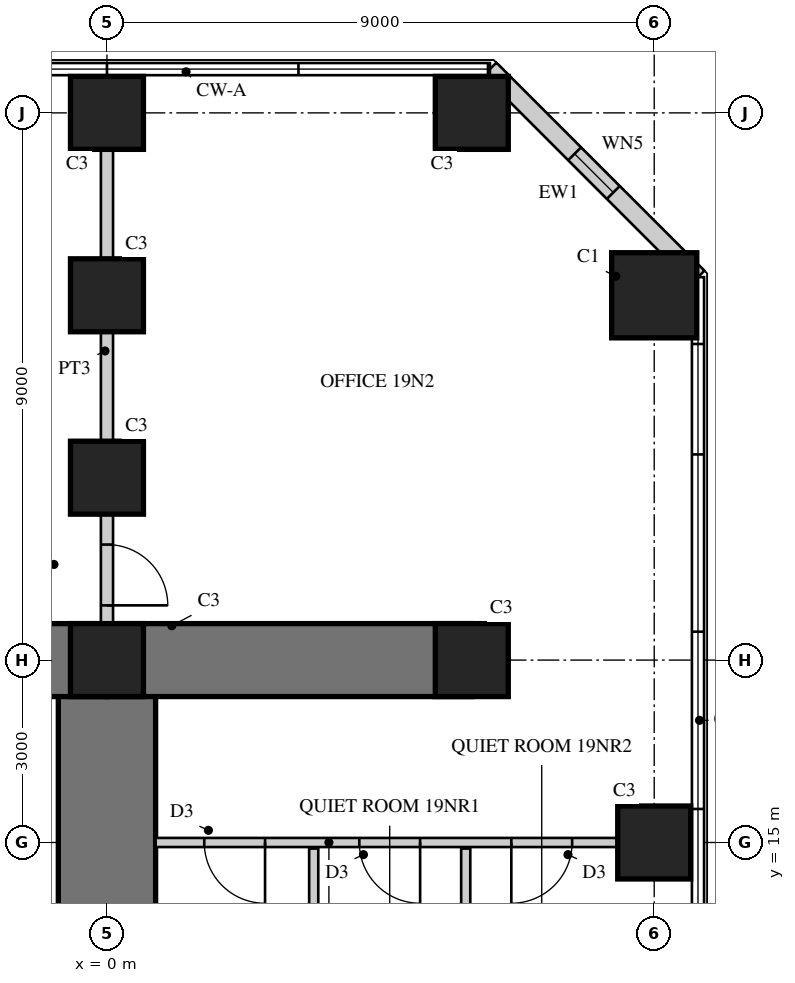
"""IFC4 building model, lengths in metres.
Left out: names, types, materials, properties, quantities, classifications, styles, units other than length and angle.
Written with IfcOpenShell. Run it as: python <this file> out.ifc"""

import sys

from ifc_helpers import new_model, si_unit, direction, frame, frame_2d, origin, origin_2d, place, context, subcontext, project, spatial, rectangle, hollow_rectangle, extrude, element, fill, save


model = new_model("IFC4")
c1 = context("Model", 3, precision=1e-05, world=origin(), true_north=direction((0.0, 1.0)))
c2 = subcontext(c1, "Body", "Model", "MODEL_VIEW")
j1 = project(units=[si_unit("LENGTHUNIT", "METRE"), si_unit("PLANEANGLEUNIT", "RADIAN")], contexts=[c1])
p1 = place(None, origin())
s1 = spatial("IfcSite", under=j1, at=p1, CompositionType="ELEMENT")
p2 = place(p1, origin())
s2 = spatial("IfcBuilding", under=s1, at=p2, CompositionType="ELEMENT")
p3 = place(p2, frame((0.0, 0.0, 79.5)))
s3 = spatial("IfcBuildingStorey", under=s2, at=p3, CompositionType="ELEMENT", Elevation=79.5)
p4 = place(p3, frame((0.0, 9.0, 0.0), z_axis=(0.0, 0.0, 1.0), x_axis=(0.0, 1.0, 0.0)))
e1 = element("IfcWall", 1, at=p4, inside=s3, PredefinedType="SHEAR", context=c2, shape_type="SweptSolid", body=[
    extrude(rectangle(XDim=9.0, YDim=1.6, at=frame_2d((4.5, 0.0))), origin(), (0.0, 0.0, 1.0), 4.0),
])
for number, where, z_axis, x_axis in (
    (2, (0.0, 18.0, 0.0), (0.0, 0.0, 1.0), (-1.0, 0.0, 0.0)),
    (3, (0.0, 18.0, 0.0), (0.0, 0.0, 1.0), (1.0, 0.0, 0.0)),
):
    element("IfcWall", number, at=place(p3, frame(where, z_axis=z_axis, x_axis=x_axis)), inside=s3, PredefinedType="SHEAR", context=c2, shape_type="SweptSolid", body=[
        extrude(rectangle(XDim=6.0, YDim=1.2, at=frame_2d((3.0, 0.0))), origin(), (0.0, 0.0, 1.0), 4.0),
    ])
p5 = place(p3, frame((9.0, 15.0, 0.0), z_axis=(0.0, 0.0, 1.0), x_axis=(1.0, 0.0, 0.0)))
e4 = element("IfcColumn", 4, at=p5, inside=s3, PredefinedType="COLUMN", context=c2, shape_type="SweptSolid", body=[
    extrude(rectangle(XDim=1.2, YDim=1.2, at=origin_2d()), origin(), (0.0, 0.0, 1.0), 4.0),
])
p6 = place(p3, frame((9.0, 24.0, 0.0), z_axis=(0.0, 0.0, 1.0), x_axis=(1.0, 0.0, 0.0)))
e5 = element("IfcColumn", 5, at=p6, inside=s3, PredefinedType="COLUMN", context=c2, shape_type="SweptSolid", body=[
    extrude(rectangle(XDim=1.4, YDim=1.4, at=origin_2d()), origin(), (0.0, 0.0, 1.0), 4.0),
])
for number, where, z_axis, x_axis in (
    (6, (6.0, 27.0, 0.0), (0.0, 0.0, 1.0), (1.0, 0.0, 0.0)),
    (7, (0.0, 27.0, 0.0), (0.0, 0.0, 1.0), (1.0, 0.0, 0.0)),
    (8, (6.0, 18.0, 0.0), (0.0, 0.0, 1.0), (1.0, 0.0, 0.0)),
    (9, (0.0, 18.0, 0.0), (0.0, 0.0, 1.0), (1.0, 0.0, 0.0)),
    (10, (0.0, 21.0, 0.0), (0.0, 0.0, 1.0), (1.0, 0.0, 0.0)),
    (11, (0.0, 24.0, 0.0), (0.0, 0.0, 1.0), (1.0, 0.0, 0.0)),
):
    element("IfcColumn", number, at=place(p3, frame(where, z_axis=z_axis, x_axis=x_axis)), inside=s3, PredefinedType="COLUMN", context=c2, shape_type="SweptSolid", body=[
        extrude(rectangle(XDim=1.2, YDim=1.2, at=origin_2d()), origin(), (0.0, 0.0, 1.0), 4.0),
    ])
p7 = place(p3, frame((9.72, 24.298, 0.0), z_axis=(0.0, 0.0, 1.0), x_axis=(-0.707106781187, 0.707106781187, 0.0)))
e12 = element("IfcWall", 12, at=p7, inside=s3, PredefinedType="SOLIDWALL", context=c2, shape_type="SweptSolid", body=[
    extrude(rectangle(XDim=4.839, YDim=0.3, at=frame_2d((2.419, 0.0))), origin(), (0.0, 0.0, 1.0), 3.8),
])
p8 = place(p7, frame((1.969, 0.0, 0.3)))
e13 = element("IfcOpeningElement", 13, at=p8, cuts=e12, PredefinedType="OPENING", context=c2, shape_type="SweptSolid", body=[
    extrude(rectangle(XDim=0.9, YDim=2.4, at=frame_2d((0.45, 1.2))), frame((0.0, 0.16, 0.0), z_axis=(0.0, -1.0, 0.0), x_axis=(1.0, 0.0, 0.0)), (0.0, 0.0, 1.0), 0.32),
])
p9 = place(p3, frame((8.4, 15.0, 0.0), z_axis=(0.0, 0.0, 1.0), x_axis=(-1.0, 0.0, 0.0)))
e14 = element("IfcWall", 14, at=p9, inside=s3, PredefinedType="PARTITIONING", context=c2, shape_type="SweptSolid", body=[
    extrude(rectangle(XDim=7.6, YDim=0.15, at=frame_2d((3.8, 0.0))), origin(), (0.0, 0.0, 1.0), 2.95),
])
p10 = place(p9, frame((0.75, 0.0, 0.0)))
e15 = element("IfcOpeningElement", 15, at=p10, cuts=e14, PredefinedType="OPENING", context=c2, shape_type="SweptSolid", body=[
    extrude(rectangle(XDim=1.0, YDim=2.1, at=frame_2d((0.5, 1.05))), frame((0.0, 0.085, 0.0), z_axis=(0.0, -1.0, 0.0), x_axis=(1.0, 0.0, 0.0)), (0.0, 0.0, 1.0), 0.17),
])
p11 = place(p9, frame((3.25, 0.0, 0.0)))
e16 = element("IfcOpeningElement", 16, at=p11, cuts=e14, PredefinedType="OPENING", context=c2, shape_type="SweptSolid", body=[
    extrude(rectangle(XDim=1.0, YDim=2.1, at=frame_2d((0.5, 1.05))), frame((0.0, 0.085, 0.0), z_axis=(0.0, -1.0, 0.0), x_axis=(1.0, 0.0, 0.0)), (0.0, 0.0, 1.0), 0.17),
])
p12 = place(p9, frame((5.8, 0.0, 0.0)))
e17 = element("IfcOpeningElement", 17, at=p12, cuts=e14, PredefinedType="OPENING", context=c2, shape_type="SweptSolid", body=[
    extrude(rectangle(XDim=1.0, YDim=2.1, at=frame_2d((0.5, 1.05))), frame((0.0, 0.085, 0.0), z_axis=(0.0, -1.0, 0.0), x_axis=(1.0, 0.0, 0.0)), (0.0, 0.0, 1.0), 0.17),
])
p13 = place(p3, frame((3.4, 9.65, 0.0), z_axis=(0.0, 0.0, 1.0), x_axis=(0.0, 1.0, 0.0)))
e18 = element("IfcWall", 18, at=p13, inside=s3, PredefinedType="PARTITIONING", context=c2, shape_type="SweptSolid", body=[
    extrude(rectangle(XDim=5.25, YDim=0.15, at=frame_2d((2.625, 0.0))), origin(), (0.0, 0.0, 1.0), 3.8),
])
p14 = place(p3, frame((5.9, 9.65, 0.0), z_axis=(0.0, 0.0, 1.0), x_axis=(0.0, 1.0, 0.0)))
e19 = element("IfcWall", 19, at=p14, inside=s3, PredefinedType="PARTITIONING", context=c2, shape_type="SweptSolid", body=[
    extrude(rectangle(XDim=5.25, YDim=0.15, at=frame_2d((2.625, 0.0))), origin(), (0.0, 0.0, 1.0), 3.0),
])
p15 = place(p3, frame((0.0, 18.0, 0.0), z_axis=(0.0, 0.0, 1.0), x_axis=(0.0, 1.0, 0.0)))
e20 = element("IfcWall", 20, at=p15, inside=s3, PredefinedType="SOLIDWALL", context=c2, shape_type="SweptSolid", body=[
    extrude(rectangle(XDim=3.0, YDim=0.2, at=frame_2d((1.5, 0.0))), origin(), (0.0, 0.0, 1.0), 3.8),
])
p16 = place(p15, frame((0.9, 0.0, 0.0)))
e21 = element("IfcOpeningElement", 21, at=p16, cuts=e20, PredefinedType="OPENING", context=c2, shape_type="SweptSolid", body=[
    extrude(rectangle(XDim=1.0, YDim=2.2, at=frame_2d((0.5, 1.1))), frame((0.0, 0.11, 0.0), z_axis=(0.0, -1.0, 0.0), x_axis=(1.0, 0.0, 0.0)), (0.0, 0.0, 1.0), 0.22),
])
p17 = place(p3, frame((0.0, 21.0, 0.0), z_axis=(0.0, 0.0, 1.0), x_axis=(0.0, 1.0, 0.0)))
e22 = element("IfcWall", 22, at=p17, inside=s3, PredefinedType="SOLIDWALL", context=c2, shape_type="SweptSolid", body=[
    extrude(rectangle(XDim=6.0, YDim=0.2, at=frame_2d((3.0, 0.0))), origin(), (0.0, 0.0, 1.0), 2.9),
])
p18 = place(p8, origin())
e23 = element("IfcWindow", 23, at=p18, inside=s3, PartitioningType="SINGLE_PANEL", PredefinedType="WINDOW", context=c2, shape_type="SweptSolid", body=[
    extrude(hollow_rectangle(XDim=0.9, YDim=2.4, WallThickness=0.06, at=frame_2d((0.45, 1.2))), frame((0.0, 0.03, 0.0), z_axis=(0.0, -1.0, 0.0), x_axis=(1.0, 0.0, 0.0)), (0.0, 0.0, 1.0), 0.06),
    extrude(rectangle(XDim=0.779, YDim=2.279, at=frame_2d((0.45, 1.2))), frame((0.0, 0.03, 0.0), z_axis=(0.0, -1.0, 0.0), x_axis=(1.0, 0.0, 0.0)), (0.0, 0.0, 1.0), 0.06),
])
fill(e13, e23)
p19 = place(p10, origin())
e24 = element("IfcDoor", 24, at=p19, inside=s3, OperationType="SINGLE_SWING_RIGHT", PredefinedType="DOOR", context=c2, shape_type="SweptSolid", body=[
    extrude(rectangle(XDim=1.0, YDim=2.1, at=frame_2d((0.5, 1.05))), frame((0.0, 0.025, 0.0), z_axis=(0.0, -1.0, 0.0), x_axis=(1.0, 0.0, 0.0)), (0.0, 0.0, 1.0), 0.05),
])
fill(e15, e24)
p20 = place(p11, origin())
e25 = element("IfcDoor", 25, at=p20, inside=s3, OperationType="SINGLE_SWING_LEFT", PredefinedType="DOOR", context=c2, shape_type="SweptSolid", body=[
    extrude(rectangle(XDim=1.0, YDim=2.1, at=frame_2d((0.5, 1.05))), frame((0.0, 0.025, 0.0), z_axis=(0.0, -1.0, 0.0), x_axis=(1.0, 0.0, 0.0)), (0.0, 0.0, 1.0), 0.05),
])
fill(e16, e25)
p21 = place(p12, origin())
e26 = element("IfcDoor", 26, at=p21, inside=s3, OperationType="SINGLE_SWING_LEFT", PredefinedType="DOOR", context=c2, shape_type="SweptSolid", body=[
    extrude(rectangle(XDim=1.0, YDim=2.1, at=frame_2d((0.5, 1.05))), frame((0.0, 0.025, 0.0), z_axis=(0.0, -1.0, 0.0), x_axis=(1.0, 0.0, 0.0)), (0.0, 0.0, 1.0), 0.05),
])
fill(e17, e26)
p22 = place(p16, frame((1.0, 0.0, 0.0), z_axis=(0.0, 0.0, 1.0), x_axis=(-1.0, 0.0, 0.0)))
e27 = element("IfcDoor", 27, at=p22, inside=s3, OperationType="SINGLE_SWING_RIGHT", PredefinedType="DOOR", context=c2, shape_type="SweptSolid", body=[
    extrude(rectangle(XDim=1.0, YDim=2.2, at=frame_2d((0.5, 1.1))), frame((0.0, 0.025, 0.0), z_axis=(0.0, -1.0, 0.0), x_axis=(1.0, 0.0, 0.0)), (0.0, 0.0, 1.0), 0.05),
])
fill(e21, e27)
save(model, sys.argv[1])
